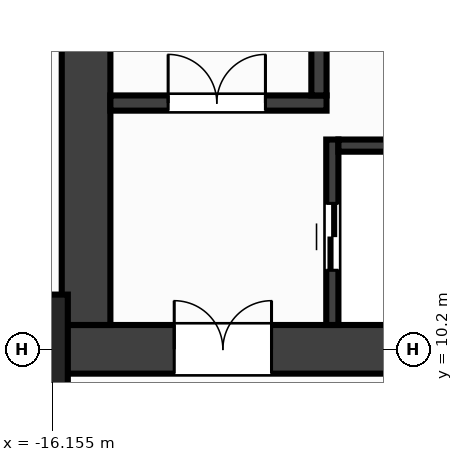
"""IFC4 building model, lengths in metres.
Left out: names, types, materials, properties, quantities, classifications, styles, units other than length and angle.
Written with IfcOpenShell. Run it as: python <this file> out.ifc"""

import sys

from ifc_helpers import new_model, si_unit, direction, frame, frame_2d, origin, origin_2d, place, context, subcontext, project, spatial, rectangle, extrude, source, transform, mapped, element, fill, save


model = new_model("IFC4")
c1 = context("Model", 3, precision=1e-05, world=origin(), true_north=direction((0.0, 1.0)))
c2 = subcontext(c1, "Body", "Model", "MODEL_VIEW")
j1 = project(units=[si_unit("LENGTHUNIT", "METRE"), si_unit("PLANEANGLEUNIT", "RADIAN")], contexts=[c1])
p1 = place(None, origin())
s1 = spatial("IfcSite", under=j1, at=p1, CompositionType="ELEMENT")
p2 = place(p1, origin())
s2 = spatial("IfcBuilding", under=s1, at=p2, CompositionType="ELEMENT")
p3 = place(p2, frame((0.0, 0.0, 70.4)))
s3 = spatial("IfcBuildingStorey", under=s2, at=p3, CompositionType="ELEMENT", Elevation=70.4)
m1 = source(origin(), c2, "Body", "SweptSolid", [
    extrude(rectangle(XDim=32.0, YDim=0.8, at=frame_2d((16.0, 0.0))), origin(), (0.0, 0.0, 1.0), 7.2),
])
p4 = place(p3, frame((-16.0, 10.2, 0.0), z_axis=(0.0, 0.0, 1.0), x_axis=(1.0, 0.0, 0.0)))
e1 = element("IfcWall", 1, at=p4, inside=s3, PredefinedType="SHEAR", context=c2, shape_type="MappedRepresentation", body=[
    mapped(m1, transform((0.0, 0.0, 0.0), x_axis=(1.0, 0.0, 0.0), y_axis=(0.0, 1.0, 0.0), z_axis=(0.0, 0.0, 1.0), scale=1.0)),
])
p5 = place(p4, frame((1.85, 0.0, 0.0)))
e2 = element("IfcOpeningElement", 2, at=p5, cuts=e1, PredefinedType="OPENING", context=c2, shape_type="SweptSolid", body=[
    extrude(rectangle(XDim=1.6, YDim=2.15, at=frame_2d((0.8, 1.075))), frame((0.0, 0.412, 0.0), z_axis=(0.0, -1.0, 0.0), x_axis=(1.0, 0.0, 0.0)), (0.0, 0.0, 1.0), 0.824),
])
p6 = place(p4, frame((28.55, 0.0, 0.0)))
e3 = element("IfcOpeningElement", 3, at=p6, cuts=e1, PredefinedType="OPENING", context=c2, shape_type="SweptSolid", body=[
    extrude(rectangle(XDim=1.6, YDim=2.15, at=frame_2d((0.8, 1.075))), frame((0.0, 0.412, 0.0), z_axis=(0.0, -1.0, 0.0), x_axis=(1.0, 0.0, 0.0)), (0.0, 0.0, 1.0), 0.824),
])
p7 = place(p4, frame((15.25, 0.0, 0.0)))
e4 = element("IfcOpeningElement", 4, at=p7, cuts=e1, PredefinedType="OPENING", context=c2, shape_type="SweptSolid", body=[
    extrude(rectangle(XDim=1.5, YDim=2.2, at=frame_2d((0.75, 1.1))), frame((0.0, 0.412, 0.0), z_axis=(0.0, -1.0, 0.0), x_axis=(1.0, 0.0, 0.0)), (0.0, 0.0, 1.0), 0.824),
])
m2 = source(origin(), c2, "Body", "SweptSolid", [
    extrude(rectangle(XDim=12.8, YDim=0.8, at=frame_2d((6.4, 0.0))), origin(), (0.0, 0.0, 1.0), 7.2),
])
p8 = place(p3, frame((-15.6, 10.6, 0.0), z_axis=(0.0, 0.0, 1.0), x_axis=(0.0, 1.0, 0.0)))
e5 = element("IfcWall", 5, at=p8, inside=s3, PredefinedType="SHEAR", context=c2, shape_type="MappedRepresentation", body=[
    mapped(m2, transform((0.0, 0.0, 0.0), x_axis=(1.0, 0.0, 0.0), y_axis=(0.0, 1.0, 0.0), z_axis=(0.0, 0.0, 1.0), scale=1.0)),
])
m3 = source(origin(), c2, "Body", "SweptSolid", [
    extrude(rectangle(XDim=3.555, YDim=0.25, at=frame_2d((1.777, 0.0))), origin(), (0.0, 0.0, 1.0), 7.2),
])
p9 = place(p3, frame((-15.2, 14.25, 0.0), z_axis=(0.0, 0.0, 1.0), x_axis=(1.0, 0.0, 0.0)))
e6 = element("IfcWall", 6, at=p9, inside=s3, PredefinedType="SHEAR", context=c2, shape_type="MappedRepresentation", body=[
    mapped(m3, transform((0.0, 0.0, 0.0), x_axis=(1.0, 0.0, 0.0), y_axis=(0.0, 1.0, 0.0), z_axis=(0.0, 0.0, 1.0), scale=1.0)),
])
p10 = place(p9, frame((0.95, 0.0, 0.0)))
e7 = element("IfcOpeningElement", 7, at=p10, cuts=e6, PredefinedType="OPENING", context=c2, shape_type="SweptSolid", body=[
    extrude(rectangle(XDim=1.6, YDim=2.15, at=frame_2d((0.8, 1.075))), frame((0.0, 0.137, 0.0), z_axis=(0.0, -1.0, 0.0), x_axis=(1.0, 0.0, 0.0)), (0.0, 0.0, 1.0), 0.274),
])
m4 = source(origin(), c2, "Body", "SweptSolid", [
    extrude(rectangle(XDim=9.025, YDim=0.25, at=frame_2d((4.512, 0.0))), origin(), (0.0, 0.0, 1.0), 7.2),
])
p11 = place(p3, frame((-11.77, 14.375, 0.0), z_axis=(0.0, 0.0, 1.0), x_axis=(0.0, 1.0, 0.0)))
e8 = element("IfcWall", 8, at=p11, inside=s3, PredefinedType="SHEAR", context=c2, shape_type="MappedRepresentation", body=[
    mapped(m4, transform((0.0, 0.0, 0.0), x_axis=(1.0, 0.0, 0.0), y_axis=(0.0, 1.0, 0.0), z_axis=(0.0, 0.0, 1.0), scale=1.0)),
])
m5 = source(origin(), c2, "Body", "SweptSolid", [
    extrude(rectangle(XDim=3.05, YDim=0.2, at=frame_2d((1.525, 0.0))), origin(), (0.0, 0.0, 1.0), 7.2),
])
p12 = place(p3, frame((-11.55, 10.6, 0.0), z_axis=(0.0, 0.0, 1.0), x_axis=(0.0, 1.0, 0.0)))
e9 = element("IfcWall", 9, at=p12, inside=s3, PredefinedType="SHEAR", context=c2, shape_type="MappedRepresentation", body=[
    mapped(m5, transform((0.0, 0.0, 0.0), x_axis=(1.0, 0.0, 0.0), y_axis=(0.0, 1.0, 0.0), z_axis=(0.0, 0.0, 1.0), scale=1.0)),
])
p13 = place(p12, frame((0.9, 0.0, 0.0)))
e10 = element("IfcOpeningElement", 10, at=p13, cuts=e9, PredefinedType="OPENING", context=c2, shape_type="SweptSolid", body=[
    extrude(rectangle(XDim=1.1, YDim=2.15, at=frame_2d((0.55, 1.075))), frame((0.0, 0.112, 0.0), z_axis=(0.0, -1.0, 0.0), x_axis=(1.0, 0.0, 0.0)), (0.0, 0.0, 1.0), 0.224),
])
m6 = source(origin(), c2, "Body", "SweptSolid", [
    extrude(rectangle(XDim=2.825, YDim=0.2, at=frame_2d((1.413, 0.0))), origin(), (0.0, 0.0, 1.0), 7.2),
])
p14 = place(p3, frame((-11.45, 13.55, 0.0), z_axis=(0.0, 0.0, 1.0), x_axis=(1.0, 0.0, 0.0)))
e11 = element("IfcWall", 11, at=p14, inside=s3, PredefinedType="SHEAR", context=c2, shape_type="MappedRepresentation", body=[
    mapped(m6, transform((0.0, 0.0, 0.0), x_axis=(1.0, 0.0, 0.0), y_axis=(0.0, 1.0, 0.0), z_axis=(0.0, 0.0, 1.0), scale=1.0)),
])
m7 = source(origin(), c2, "Body", "SweptSolid", [
    extrude(rectangle(XDim=1.8, YDim=1.8, at=origin_2d()), origin(), (0.0, 0.0, 1.0), 7.2),
])
p15 = place(p3, frame((-16.8, 10.2, 0.0), z_axis=(0.0, 0.0, 1.0), x_axis=(1.0, 0.0, 0.0)))
e12 = element("IfcColumn", 12, at=p15, inside=s3, PredefinedType="COLUMN", context=c2, shape_type="MappedRepresentation", body=[
    mapped(m7, transform((0.0, 0.0, 0.0), x_axis=(1.0, 0.0, 0.0), y_axis=(0.0, 1.0, 0.0), z_axis=(0.0, 0.0, 1.0), scale=1.0)),
])
m8 = source(origin(), c2, "Body", "SweptSolid", [
    extrude(rectangle(XDim=1.6, YDim=2.15, at=frame_2d((0.8, 1.075))), frame((0.0, 0.025, 0.0), z_axis=(0.0, -1.0, 0.0), x_axis=(1.0, 0.0, 0.0)), (0.0, 0.0, 1.0), 0.05),
])
p16 = place(p10, origin())
e13 = element("IfcDoor", 13, at=p16, inside=s3, OperationType="DOUBLE_DOOR_SINGLE_SWING", PredefinedType="DOOR", context=c2, shape_type="MappedRepresentation", body=[
    mapped(m8, transform((0.0, 0.0, 0.0), x_axis=(1.0, 0.0, 0.0), y_axis=(0.0, 1.0, 0.0), z_axis=(0.0, 0.0, 1.0), scale=1.0)),
])
fill(e7, e13)
p17 = place(p5, origin())
e14 = element("IfcDoor", 14, at=p17, inside=s3, OperationType="DOUBLE_DOOR_SINGLE_SWING", PredefinedType="DOOR", context=c2, shape_type="MappedRepresentation", body=[
    mapped(m8, transform((0.0, 0.0, 0.0), x_axis=(1.0, 0.0, 0.0), y_axis=(0.0, 1.0, 0.0), z_axis=(0.0, 0.0, 1.0), scale=1.0)),
])
fill(e2, e14)
m9 = source(origin(), c2, "Body", "SweptSolid", [
    extrude(rectangle(XDim=1.1, YDim=2.15, at=frame_2d((0.55, 1.075))), frame((0.0, 0.025, 0.0), z_axis=(0.0, -1.0, 0.0), x_axis=(1.0, 0.0, 0.0)), (0.0, 0.0, 1.0), 0.05),
])
p18 = place(p13, origin())
e15 = element("IfcDoor", 15, at=p18, inside=s3, OperationType="DOUBLE_DOOR_SLIDING", PredefinedType="DOOR", context=c2, shape_type="MappedRepresentation", body=[
    mapped(m9, transform((0.0, 0.0, 0.0), x_axis=(1.0, 0.0, 0.0), y_axis=(0.0, 1.0, 0.0), z_axis=(0.0, 0.0, 1.0), scale=1.0)),
])
fill(e10, e15)
save(model, sys.argv[1])
